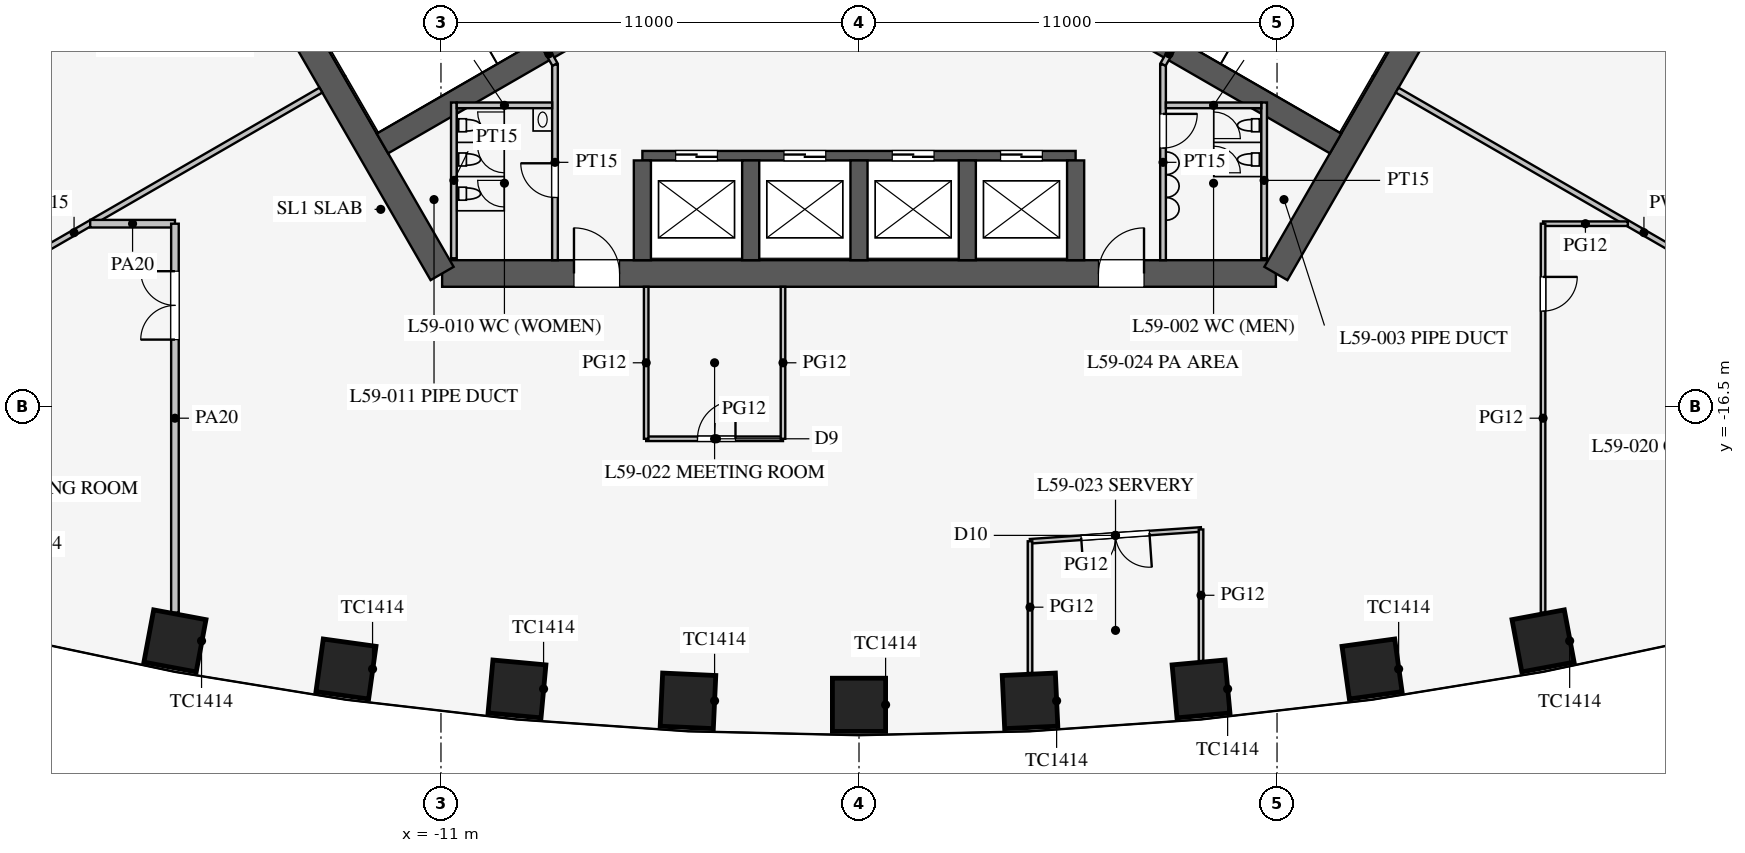
"""IFC4 building model, lengths in metres.
Left out: names, types, materials, properties, quantities, classifications, styles, units other than length and angle.
Written with IfcOpenShell. Run it as: python <this file> out.ifc"""

import sys

from ifc_helpers import new_model, si_unit, direction, frame, frame_2d, origin, origin_2d, place, context, subcontext, project, spatial, rectangle, extrude, element, fill, save


model = new_model("IFC4")
c1 = context("Model", 3, precision=1e-05, world=origin(), true_north=direction((0.0, 1.0)))
c2 = subcontext(c1, "Body", "Model", "MODEL_VIEW")
j1 = project(units=[si_unit("LENGTHUNIT", "METRE"), si_unit("PLANEANGLEUNIT", "RADIAN")], contexts=[c1])
p1 = place(None, origin())
s1 = spatial("IfcSite", under=j1, at=p1, CompositionType="ELEMENT")
p2 = place(p1, origin())
s2 = spatial("IfcBuilding", under=s1, at=p2, CompositionType="ELEMENT")
p3 = place(p2, frame((0.0, 0.0, 256.9)))
s3 = spatial("IfcBuildingStorey", under=s2, at=p3, CompositionType="ELEMENT", Elevation=256.9)
for number, where, z_axis, x_axis in (
    (1, (-18.0, -22.669, 0.0), (0.0, 0.0, 1.0), (0.983, -0.184, 0.0)),
    (2, (-13.5, -23.408, 0.0), (0.0, 0.0, 1.0), (0.99, -0.138, 0.0)),
    (3, (-9.0, -23.933, 0.0), (0.0, 0.0, 1.0), (0.996, -0.092, 0.0)),
    (4, (-4.5, -24.246, 0.0), (0.0, 0.0, 1.0), (0.999, -0.046, 0.0)),
    (5, (0.0, -24.351, 0.0), (0.0, 0.0, 1.0), (1.0, 0.0, 0.0)),
    (6, (4.5, -24.246, 0.0), (0.0, 0.0, 1.0), (0.999, 0.046, 0.0)),
    (7, (9.0, -23.933, 0.0), (0.0, 0.0, 1.0), (0.996, 0.092, 0.0)),
    (8, (13.5, -23.408, 0.0), (0.0, 0.0, 1.0), (0.99, 0.138, 0.0)),
    (9, (18.0, -22.669, 0.0), (0.0, 0.0, 1.0), (0.983, 0.184, 0.0)),
):
    element("IfcColumn", number, at=place(p3, frame(where, z_axis=z_axis, x_axis=x_axis)), inside=s3, PredefinedType="COLUMN", context=c2, shape_type="SweptSolid", body=[
        extrude(rectangle(XDim=1.4, YDim=1.4, at=origin_2d()), origin(), (0.0, 0.0, 1.0), 4.2),
    ])
p4 = place(p3, frame((-10.97, -13.0, 0.0), z_axis=(0.0, 0.0, 1.0), x_axis=(1.0, 0.0, 0.0)))
e10 = element("IfcWall", 10, at=p4, inside=s3, PredefinedType="SHEAR", context=c2, shape_type="SweptSolid", body=[
    extrude(rectangle(XDim=21.939, YDim=0.7, at=frame_2d((10.97, 0.0))), origin(), (0.0, 0.0, 1.0), 4.2),
])
p5 = place(p4, frame((17.27, 0.0, 0.0)))
e11 = element("IfcOpeningElement", 11, at=p5, cuts=e10, PredefinedType="OPENING", context=c2, shape_type="SweptSolid", body=[
    extrude(rectangle(XDim=1.2, YDim=2.1, at=frame_2d((0.6, 1.05))), frame((0.0, 0.36, 0.0), z_axis=(0.0, -1.0, 0.0), x_axis=(1.0, 0.0, 0.0)), (0.0, 0.0, 1.0), 0.72),
])
p6 = place(p4, frame((3.47, 0.0, 0.0)))
e12 = element("IfcOpeningElement", 12, at=p6, cuts=e10, PredefinedType="OPENING", context=c2, shape_type="SweptSolid", body=[
    extrude(rectangle(XDim=1.2, YDim=2.1, at=frame_2d((0.6, 1.05))), frame((0.0, 0.36, 0.0), z_axis=(0.0, -1.0, 0.0), x_axis=(1.0, 0.0, 0.0)), (0.0, 0.0, 1.0), 0.72),
])
for number, where, z_axis, x_axis in (
    (13, (10.97, -13.0, 0.0), (0.0, 0.0, 1.0), (0.5, 0.866, 0.0)),
    (14, (-16.743, -3.0, 0.0), (0.0, 0.0, 1.0), (0.5, -0.866, 0.0)),
):
    element("IfcWall", number, at=place(p3, frame(where, z_axis=z_axis, x_axis=x_axis)), inside=s3, PredefinedType="SHEAR", context=c2, shape_type="SweptSolid", body=[
        extrude(rectangle(XDim=11.547, YDim=0.7, at=frame_2d((5.773, 0.0))), origin(), (0.0, 0.0, 1.0), 4.2),
    ])
p7 = place(p3, frame((-5.7, -9.9, 0.0), z_axis=(0.0, 0.0, 1.0), x_axis=(1.0, 0.0, 0.0)))
e15 = element("IfcWall", 15, at=p7, inside=s3, PredefinedType="SHEAR", context=c2, shape_type="SweptSolid", body=[
    extrude(rectangle(XDim=11.4, YDim=0.25, at=frame_2d((5.7, 0.0))), origin(), (0.0, 0.0, 1.0), 4.2),
])
p8 = place(p7, frame((0.875, 0.0, 0.0)))
e16 = element("IfcOpeningElement", 16, at=p8, cuts=e15, PredefinedType="OPENING", context=c2, shape_type="SweptSolid", body=[
    extrude(rectangle(XDim=1.1, YDim=2.2, at=frame_2d((0.55, 1.1))), frame((0.0, 0.135, 0.0), z_axis=(0.0, -1.0, 0.0), x_axis=(1.0, 0.0, 0.0)), (0.0, 0.0, 1.0), 0.27),
])
p9 = place(p7, frame((3.725, 0.0, 0.0)))
e17 = element("IfcOpeningElement", 17, at=p9, cuts=e15, PredefinedType="OPENING", context=c2, shape_type="SweptSolid", body=[
    extrude(rectangle(XDim=1.1, YDim=2.2, at=frame_2d((0.55, 1.1))), frame((0.0, 0.135, 0.0), z_axis=(0.0, -1.0, 0.0), x_axis=(1.0, 0.0, 0.0)), (0.0, 0.0, 1.0), 0.27),
])
p10 = place(p7, frame((6.575, 0.0, 0.0)))
e18 = element("IfcOpeningElement", 18, at=p10, cuts=e15, PredefinedType="OPENING", context=c2, shape_type="SweptSolid", body=[
    extrude(rectangle(XDim=1.1, YDim=2.2, at=frame_2d((0.55, 1.1))), frame((0.0, 0.135, 0.0), z_axis=(0.0, -1.0, 0.0), x_axis=(1.0, 0.0, 0.0)), (0.0, 0.0, 1.0), 0.27),
])
p11 = place(p7, frame((9.425, 0.0, 0.0)))
e19 = element("IfcOpeningElement", 19, at=p11, cuts=e15, PredefinedType="OPENING", context=c2, shape_type="SweptSolid", body=[
    extrude(rectangle(XDim=1.1, YDim=2.2, at=frame_2d((0.55, 1.1))), frame((0.0, 0.135, 0.0), z_axis=(0.0, -1.0, 0.0), x_axis=(1.0, 0.0, 0.0)), (0.0, 0.0, 1.0), 0.27),
])
for number, where, z_axis, x_axis in (
    (20, (-5.7, -10.025, 0.0), (0.0, 0.0, 1.0), (0.0, -1.0, 0.0)),
    (21, (-2.85, -10.025, 0.0), (0.0, 0.0, 1.0), (0.0, -1.0, 0.0)),
    (22, (0.0, -10.025, 0.0), (0.0, 0.0, 1.0), (0.0, -1.0, 0.0)),
    (23, (2.85, -10.025, 0.0), (0.0, 0.0, 1.0), (0.0, -1.0, 0.0)),
    (24, (5.7, -10.025, 0.0), (0.0, 0.0, 1.0), (0.0, -1.0, 0.0)),
):
    element("IfcWall", number, at=place(p3, frame(where, z_axis=z_axis, x_axis=x_axis)), inside=s3, PredefinedType="SHEAR", context=c2, shape_type="SweptSolid", body=[
        extrude(rectangle(XDim=2.625, YDim=0.45, at=frame_2d((1.312, 0.0))), origin(), (0.0, 0.0, 1.0), 4.2),
    ])
for number, where, z_axis, x_axis in (
    (25, (4.638, -5.016, 0.0), (0.0, 0.0, 1.0), (0.866, -0.5, 0.0)),
    (26, (-4.638, -5.016, 0.0), (0.0, 0.0, 1.0), (-0.866, -0.5, 0.0)),
):
    element("IfcWall", number, at=place(p3, frame(where, z_axis=z_axis, x_axis=x_axis)), inside=s3, PredefinedType="SHEAR", context=c2, shape_type="SweptSolid", body=[
        extrude(rectangle(XDim=9.125, YDim=0.6, at=frame_2d((4.562, 0.0))), origin(), (0.0, 0.0, 1.0), 4.2),
    ])
p12 = place(p3, frame((8.0, -7.5, 0.0), z_axis=(0.0, 0.0, 1.0), x_axis=(0.0, -1.0, 0.0)))
e27 = element("IfcWall", 27, at=p12, inside=s3, PredefinedType="PARTITIONING", context=c2, shape_type="SweptSolid", body=[
    extrude(rectangle(XDim=5.15, YDim=0.15, at=frame_2d((2.575, 0.0))), origin(), (0.0, 0.0, 1.0), 4.0),
])
p13 = place(p12, frame((1.3, 0.0, 0.0)))
e28 = element("IfcOpeningElement", 28, at=p13, cuts=e27, PredefinedType="OPENING", context=c2, shape_type="SweptSolid", body=[
    extrude(rectangle(XDim=0.9, YDim=2.1, at=frame_2d((0.45, 1.05))), frame((0.0, 0.085, 0.0), z_axis=(0.0, -1.0, 0.0), x_axis=(1.0, 0.0, 0.0)), (0.0, 0.0, 1.0), 0.17),
])
p14 = place(p3, frame((-8.0, -7.5, 0.0), z_axis=(0.0, 0.0, 1.0), x_axis=(0.0, -1.0, 0.0)))
e29 = element("IfcWall", 29, at=p14, inside=s3, PredefinedType="PARTITIONING", context=c2, shape_type="SweptSolid", body=[
    extrude(rectangle(XDim=5.15, YDim=0.15, at=frame_2d((2.575, 0.0))), origin(), (0.0, 0.0, 1.0), 4.0),
])
p15 = place(p14, frame((2.6, 0.0, 0.0)))
e30 = element("IfcOpeningElement", 30, at=p15, cuts=e29, PredefinedType="OPENING", context=c2, shape_type="SweptSolid", body=[
    extrude(rectangle(XDim=0.9, YDim=2.1, at=frame_2d((0.45, 1.05))), frame((0.0, 0.085, 0.0), z_axis=(0.0, -1.0, 0.0), x_axis=(1.0, 0.0, 0.0)), (0.0, 0.0, 1.0), 0.17),
])
for number, where, z_axis, x_axis in (
    (31, (8.0, -7.5, 0.0), (0.0, 0.0, 1.0), (0.5, 0.866, 0.0)),
    (32, (-8.0, -7.5, 0.0), (0.0, 0.0, 1.0), (-0.5, 0.866, 0.0)),
):
    element("IfcWall", number, at=place(p3, frame(where, z_axis=z_axis, x_axis=x_axis)), inside=s3, PredefinedType="PARTITIONING", context=c2, shape_type="SweptSolid", body=[
        extrude(rectangle(XDim=0.645, YDim=0.15, at=frame_2d((0.323, 0.0))), origin(), (0.0, 0.0, 1.0), 4.0),
    ])
p16 = place(p3, frame((10.66, -8.5, 0.0), z_axis=(0.0, 0.0, 1.0), x_axis=(0.0, -1.0, 0.0)))
e33 = element("IfcWall", 33, at=p16, inside=s3, PredefinedType="PARTITIONING", context=c2, shape_type="SweptSolid", body=[
    extrude(rectangle(XDim=4.1, YDim=0.15, at=frame_2d((2.05, 0.0))), origin(), (0.0, 0.0, 1.0), 4.0),
])
p17 = place(p3, frame((8.075, -8.575, 0.0), z_axis=(0.0, 0.0, 1.0), x_axis=(1.0, 0.0, 0.0)))
e34 = element("IfcWall", 34, at=p17, inside=s3, PredefinedType="PARTITIONING", context=c2, shape_type="SweptSolid", body=[
    extrude(rectangle(XDim=2.51, YDim=0.15, at=frame_2d((1.255, 0.0))), origin(), (0.0, 0.0, 1.0), 4.0),
])
p18 = place(p3, frame((-10.66, -8.5, 0.0), z_axis=(0.0, 0.0, 1.0), x_axis=(0.0, -1.0, 0.0)))
e35 = element("IfcWall", 35, at=p18, inside=s3, PredefinedType="PARTITIONING", context=c2, shape_type="SweptSolid", body=[
    extrude(rectangle(XDim=4.1, YDim=0.15, at=frame_2d((2.05, 0.0))), origin(), (0.0, 0.0, 1.0), 4.0),
])
p19 = place(p3, frame((-8.075, -8.575, 0.0), z_axis=(0.0, 0.0, 1.0), x_axis=(-1.0, 0.0, 0.0)))
e36 = element("IfcWall", 36, at=p19, inside=s3, PredefinedType="PARTITIONING", context=c2, shape_type="SweptSolid", body=[
    extrude(rectangle(XDim=2.51, YDim=0.15, at=frame_2d((1.255, 0.0))), origin(), (0.0, 0.0, 1.0), 4.0),
])
for number, where, z_axis, x_axis in (
    (37, (14.159, -8.175, 0.0), (0.0, 0.0, 1.0), (0.866, -0.5, 0.0)),
    (38, (-14.159, -8.175, 0.0), (0.0, 0.0, 1.0), (-0.866, -0.5, 0.0)),
):
    element("IfcWall", number, at=place(p3, frame(where, z_axis=z_axis, x_axis=x_axis)), inside=s3, PredefinedType="PARTITIONING", context=c2, shape_type="SweptSolid", body=[
        extrude(rectangle(XDim=15.0, YDim=0.15, at=frame_2d((7.5, 0.0))), origin(), (0.0, 0.0, 1.0), 2.4),
    ])
p20 = place(p3, frame((18.0, -11.69, 0.0), z_axis=(0.0, 0.0, 1.0), x_axis=(1.0, 0.0, 0.0)))
e39 = element("IfcWall", 39, at=p20, inside=s3, PredefinedType="PARTITIONING", context=c2, shape_type="SweptSolid", body=[
    extrude(rectangle(XDim=2.23, YDim=0.12, at=frame_2d((1.115, 0.0))), origin(), (0.0, 0.0, 1.0), 2.9),
])
p21 = place(p3, frame((-18.0, -11.69, 0.0), z_axis=(0.0, 0.0, 1.0), x_axis=(-1.0, 0.0, 0.0)))
e40 = element("IfcWall", 40, at=p21, inside=s3, PredefinedType="PARTITIONING", context=c2, shape_type="SweptSolid", body=[
    extrude(rectangle(XDim=2.23, YDim=0.2, at=frame_2d((1.115, 0.0))), origin(), (0.0, 0.0, 1.0), 2.9),
])
p22 = place(p3, frame((-5.6, -17.35, 0.0), z_axis=(0.0, 0.0, 1.0), x_axis=(1.0, 0.0, 0.0)))
e41 = element("IfcWall", 41, at=p22, inside=s3, PredefinedType="PARTITIONING", context=c2, shape_type="SweptSolid", body=[
    extrude(rectangle(XDim=3.6, YDim=0.12, at=frame_2d((1.8, 0.0))), origin(), (0.0, 0.0, 1.0), 2.9),
])
p23 = place(p22, frame((1.35, 0.0, 0.15)))
e42 = element("IfcOpeningElement", 42, at=p23, cuts=e41, PredefinedType="OPENING", context=c2, shape_type="SweptSolid", body=[
    extrude(rectangle(XDim=1.0, YDim=2.1, at=frame_2d((0.5, 1.05))), frame((0.0, 0.07, 0.0), z_axis=(0.0, -1.0, 0.0), x_axis=(1.0, 0.0, 0.0)), (0.0, 0.0, 1.0), 0.14),
])
for number, where, z_axis, x_axis in (
    (43, (-2.0, -13.35, 0.0), (0.0, 0.0, 1.0), (0.0, -1.0, 0.0)),
    (44, (-5.6, -13.35, 0.0), (0.0, 0.0, 1.0), (0.0, -1.0, 0.0)),
):
    element("IfcWall", number, at=place(p3, frame(where, z_axis=z_axis, x_axis=x_axis)), inside=s3, PredefinedType="PARTITIONING", context=c2, shape_type="SweptSolid", body=[
        extrude(rectangle(XDim=4.0, YDim=0.12, at=frame_2d((2.0, 0.0))), origin(), (0.0, 0.0, 1.0), 2.9),
    ])
p24 = place(p3, frame((4.5, -20.047, 0.0), z_axis=(0.0, 0.0, 1.0), x_axis=(0.997623533978, 0.068900540297, 0.0)))
e45 = element("IfcWall", 45, at=p24, inside=s3, PredefinedType="PARTITIONING", context=c2, shape_type="SweptSolid", body=[
    extrude(rectangle(XDim=4.511, YDim=0.12, at=frame_2d((2.255, 0.0))), origin(), (0.0, 0.0, 1.0), 2.9),
])
p25 = place(p24, frame((1.35, 0.0, 0.15)))
e46 = element("IfcOpeningElement", 46, at=p25, cuts=e45, PredefinedType="OPENING", context=c2, shape_type="SweptSolid", body=[
    extrude(rectangle(XDim=1.8, YDim=2.1, at=frame_2d((0.9, 1.05))), frame((0.0, 0.07, 0.0), z_axis=(0.0, -1.0, 0.0), x_axis=(1.0, 0.0, 0.0)), (0.0, 0.0, 1.0), 0.14),
])
p26 = place(p3, frame((18.0, -11.69, 0.0), z_axis=(0.0, 0.0, 1.0), x_axis=(0.0, -1.0, 0.0)))
e47 = element("IfcWall", 47, at=p26, inside=s3, PredefinedType="PARTITIONING", context=c2, shape_type="SweptSolid", body=[
    extrude(rectangle(XDim=10.237, YDim=0.12, at=frame_2d((5.118, 0.0))), origin(), (0.0, 0.0, 1.0), 2.6),
])
p27 = place(p26, frame((1.4, 0.0, 0.15)))
e48 = element("IfcOpeningElement", 48, at=p27, cuts=e47, PredefinedType="OPENING", context=c2, shape_type="SweptSolid", body=[
    extrude(rectangle(XDim=0.9, YDim=2.1, at=frame_2d((0.45, 1.05))), frame((0.0, 0.07, 0.0), z_axis=(0.0, -1.0, 0.0), x_axis=(1.0, 0.0, 0.0)), (0.0, 0.0, 1.0), 0.14),
])
p28 = place(p3, frame((4.5, -20.047, 0.0), z_axis=(0.0, 0.0, 1.0), x_axis=(0.0, -1.0, 0.0)))
e49 = element("IfcWall", 49, at=p28, inside=s3, PredefinedType="PARTITIONING", context=c2, shape_type="SweptSolid", body=[
    extrude(rectangle(XDim=3.469, YDim=0.12, at=frame_2d((1.734, 0.0))), origin(), (0.0, 0.0, 1.0), 2.6),
])
p29 = place(p3, frame((9.0, -19.736, 0.0), z_axis=(0.0, 0.0, 1.0), x_axis=(0.0, -1.0, 0.0)))
e50 = element("IfcWall", 50, at=p29, inside=s3, PredefinedType="PARTITIONING", context=c2, shape_type="SweptSolid", body=[
    extrude(rectangle(XDim=3.464, YDim=0.12, at=frame_2d((1.732, 0.0))), origin(), (0.0, 0.0, 1.0), 2.8),
])
p30 = place(p3, frame((-18.0, -11.69, 0.0), z_axis=(0.0, 0.0, 1.0), x_axis=(0.0, -1.0, 0.0)))
e51 = element("IfcWall", 51, at=p30, inside=s3, PredefinedType="PARTITIONING", context=c2, shape_type="SweptSolid", body=[
    extrude(rectangle(XDim=10.237, YDim=0.2, at=frame_2d((5.118, 0.0))), origin(), (0.0, 0.0, 1.0), 2.6),
])
p31 = place(p30, frame((1.25, 0.0, 0.15)))
e52 = element("IfcOpeningElement", 52, at=p31, cuts=e51, PredefinedType="OPENING", context=c2, shape_type="SweptSolid", body=[
    extrude(rectangle(XDim=1.8, YDim=2.1, at=frame_2d((0.9, 1.05))), frame((0.0, 0.11, 0.0), z_axis=(0.0, -1.0, 0.0), x_axis=(1.0, 0.0, 0.0)), (0.0, 0.0, 1.0), 0.22),
])
p32 = place(p3, frame((-0.016, 30.392, 0.0), z_axis=(0.0, 0.0, 1.0), x_axis=(-0.500000626146, -0.866025042278, 0.0)))
e53 = element("IfcWall", 53, at=p32, inside=s3, PredefinedType="PARTITIONING", context=c2, shape_type="SweptSolid", body=[
    extrude(rectangle(XDim=52.624, YDim=0.12, at=frame_2d((26.312, 0.0))), origin(), (0.0, 0.0, 1.0), 2.9),
])
p33 = place(p32, frame((10.15, 0.0, 0.15)))
e54 = element("IfcOpeningElement", 54, at=p33, cuts=e53, PredefinedType="OPENING", context=c2, shape_type="SweptSolid", body=[
    extrude(rectangle(XDim=1.8, YDim=2.1, at=frame_2d((0.9, 1.05))), frame((0.0, 0.07, 0.0), z_axis=(0.0, -1.0, 0.0), x_axis=(1.0, 0.0, 0.0)), (0.0, 0.0, 1.0), 0.14),
])
p34 = place(p32, frame((40.65, 0.0, 0.15)))
e55 = element("IfcOpeningElement", 55, at=p34, cuts=e53, PredefinedType="OPENING", context=c2, shape_type="SweptSolid", body=[
    extrude(rectangle(XDim=1.8, YDim=2.1, at=frame_2d((0.9, 1.05))), frame((0.0, 0.07, 0.0), z_axis=(0.0, -1.0, 0.0), x_axis=(1.0, 0.0, 0.0)), (0.0, 0.0, 1.0), 0.14),
])
p35 = place(p13, origin())
e56 = element("IfcDoor", 56, at=p35, inside=s3, OperationType="SINGLE_SWING_LEFT", PredefinedType="DOOR", context=c2, shape_type="SweptSolid", body=[
    extrude(rectangle(XDim=0.9, YDim=2.1, at=frame_2d((0.45, 1.05))), frame((0.0, 0.025, 0.0), z_axis=(0.0, -1.0, 0.0), x_axis=(1.0, 0.0, 0.0)), (0.0, 0.0, 1.0), 0.05),
])
fill(e28, e56)
p36 = place(p15, frame((0.9, 0.0, 0.0), z_axis=(0.0, 0.0, 1.0), x_axis=(-1.0, 0.0, 0.0)))
e57 = element("IfcDoor", 57, at=p36, inside=s3, OperationType="SINGLE_SWING_RIGHT", PredefinedType="DOOR", context=c2, shape_type="SweptSolid", body=[
    extrude(rectangle(XDim=0.9, YDim=2.1, at=frame_2d((0.45, 1.05))), frame((0.0, 0.025, 0.0), z_axis=(0.0, -1.0, 0.0), x_axis=(1.0, 0.0, 0.0)), (0.0, 0.0, 1.0), 0.05),
])
fill(e30, e57)
p37 = place(p5, origin())
e58 = element("IfcDoor", 58, at=p37, inside=s3, OperationType="SINGLE_SWING_RIGHT", PredefinedType="DOOR", context=c2, shape_type="SweptSolid", body=[
    extrude(rectangle(XDim=1.2, YDim=2.1, at=frame_2d((0.6, 1.05))), frame((0.0, 0.025, 0.0), z_axis=(0.0, -1.0, 0.0), x_axis=(1.0, 0.0, 0.0)), (0.0, 0.0, 1.0), 0.05),
])
fill(e11, e58)
p38 = place(p6, origin())
e59 = element("IfcDoor", 59, at=p38, inside=s3, OperationType="SINGLE_SWING_LEFT", PredefinedType="DOOR", context=c2, shape_type="SweptSolid", body=[
    extrude(rectangle(XDim=1.2, YDim=2.1, at=frame_2d((0.6, 1.05))), frame((0.0, 0.025, 0.0), z_axis=(0.0, -1.0, 0.0), x_axis=(1.0, 0.0, 0.0)), (0.0, 0.0, 1.0), 0.05),
])
fill(e12, e59)
p39 = place(p27, origin())
e60 = element("IfcDoor", 60, at=p39, inside=s3, OperationType="SINGLE_SWING_LEFT", PredefinedType="DOOR", context=c2, shape_type="SweptSolid", body=[
    extrude(rectangle(XDim=0.9, YDim=2.1, at=frame_2d((0.45, 1.05))), frame((0.0, 0.025, 0.0), z_axis=(0.0, -1.0, 0.0), x_axis=(1.0, 0.0, 0.0)), (0.0, 0.0, 1.0), 0.05),
])
fill(e48, e60)
p40 = place(p31, frame((1.8, 0.0, 0.0), z_axis=(0.0, 0.0, 1.0), x_axis=(-1.0, 0.0, 0.0)))
e61 = element("IfcDoor", 61, at=p40, inside=s3, OperationType="DOUBLE_DOOR_SINGLE_SWING", PredefinedType="DOOR", context=c2, shape_type="SweptSolid", body=[
    extrude(rectangle(XDim=1.8, YDim=2.1, at=frame_2d((0.9, 1.05))), frame((0.0, 0.025, 0.0), z_axis=(0.0, -1.0, 0.0), x_axis=(1.0, 0.0, 0.0)), (0.0, 0.0, 1.0), 0.05),
])
fill(e52, e61)
p41 = place(p23, origin())
e62 = element("IfcDoor", 62, at=p41, inside=s3, OperationType="SINGLE_SWING_RIGHT", PredefinedType="DOOR", context=c2, shape_type="SweptSolid", body=[
    extrude(rectangle(XDim=1.0, YDim=2.1, at=frame_2d((0.5, 1.05))), frame((0.0, 0.025, 0.0), z_axis=(0.0, -1.0, 0.0), x_axis=(1.0, 0.0, 0.0)), (0.0, 0.0, 1.0), 0.05),
])
fill(e42, e62)
p42 = place(p25, frame((1.8, 0.0, 0.0), z_axis=(0.0, 0.0, 1.0), x_axis=(-1.0, 0.0, 0.0)))
e63 = element("IfcDoor", 63, at=p42, inside=s3, OperationType="DOUBLE_DOOR_SINGLE_SWING", PredefinedType="DOOR", context=c2, shape_type="SweptSolid", body=[
    extrude(rectangle(XDim=1.8, YDim=2.1, at=frame_2d((0.9, 1.05))), frame((0.0, 0.025, 0.0), z_axis=(0.0, -1.0, 0.0), x_axis=(1.0, 0.0, 0.0)), (0.0, 0.0, 1.0), 0.05),
])
fill(e46, e63)
p43 = place(p8, origin())
e64 = element("IfcDoor", 64, at=p43, inside=s3, OperationType="DOUBLE_DOOR_SLIDING", PredefinedType="DOOR", context=c2, shape_type="SweptSolid", body=[
    extrude(rectangle(XDim=1.1, YDim=2.2, at=frame_2d((0.55, 1.1))), frame((0.0, 0.025, 0.0), z_axis=(0.0, -1.0, 0.0), x_axis=(1.0, 0.0, 0.0)), (0.0, 0.0, 1.0), 0.05),
])
fill(e16, e64)
p44 = place(p9, origin())
e65 = element("IfcDoor", 65, at=p44, inside=s3, OperationType="DOUBLE_DOOR_SLIDING", PredefinedType="DOOR", context=c2, shape_type="SweptSolid", body=[
    extrude(rectangle(XDim=1.1, YDim=2.2, at=frame_2d((0.55, 1.1))), frame((0.0, 0.025, 0.0), z_axis=(0.0, -1.0, 0.0), x_axis=(1.0, 0.0, 0.0)), (0.0, 0.0, 1.0), 0.05),
])
fill(e17, e65)
p45 = place(p10, origin())
e66 = element("IfcDoor", 66, at=p45, inside=s3, OperationType="DOUBLE_DOOR_SLIDING", PredefinedType="DOOR", context=c2, shape_type="SweptSolid", body=[
    extrude(rectangle(XDim=1.1, YDim=2.2, at=frame_2d((0.55, 1.1))), frame((0.0, 0.025, 0.0), z_axis=(0.0, -1.0, 0.0), x_axis=(1.0, 0.0, 0.0)), (0.0, 0.0, 1.0), 0.05),
])
fill(e18, e66)
p46 = place(p11, origin())
e67 = element("IfcDoor", 67, at=p46, inside=s3, OperationType="DOUBLE_DOOR_SLIDING", PredefinedType="DOOR", context=c2, shape_type="SweptSolid", body=[
    extrude(rectangle(XDim=1.1, YDim=2.2, at=frame_2d((0.55, 1.1))), frame((0.0, 0.025, 0.0), z_axis=(0.0, -1.0, 0.0), x_axis=(1.0, 0.0, 0.0)), (0.0, 0.0, 1.0), 0.05),
])
fill(e19, e67)
save(model, sys.argv[1])
